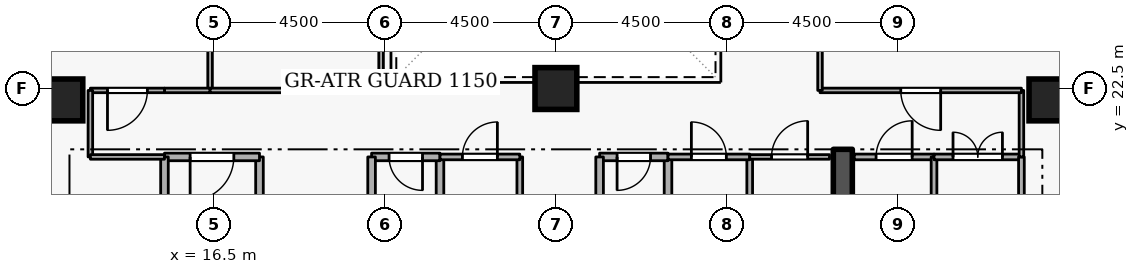
"""IFC4 building model, lengths in metres.
Left out: names, types, materials, properties, quantities, classifications, styles, units other than length and angle.
Written with IfcOpenShell. Run it as: python <this file> out.ifc"""

import sys

from ifc_helpers import new_model, si_unit, direction, frame, frame_2d, origin, origin_2d, place, context, subcontext, project, spatial, rectangle, extrude, element, fill, save


model = new_model("IFC4")
c1 = context("Model", 3, precision=1e-05, world=origin(), true_north=direction((0.0, 1.0)))
c2 = subcontext(c1, "Body", "Model", "MODEL_VIEW")
j1 = project(units=[si_unit("LENGTHUNIT", "METRE"), si_unit("PLANEANGLEUNIT", "RADIAN")], contexts=[c1])
p1 = place(None, origin())
s1 = spatial("IfcSite", under=j1, at=p1, CompositionType="ELEMENT")
p2 = place(p1, origin())
s2 = spatial("IfcBuilding", under=s1, at=p2, CompositionType="ELEMENT")
p3 = place(p2, frame((0.0, 0.0, 185.7)))
s3 = spatial("IfcBuildingStorey", under=s2, at=p3, CompositionType="ELEMENT", Elevation=185.7)
p4 = place(p3, frame((33.05, 15.1, 0.0), z_axis=(0.0, 0.0, 1.0), x_axis=(0.0, 1.0, 0.0)))
e1 = element("IfcWall", 1, at=p4, inside=s3, PredefinedType="SHEAR", context=c2, shape_type="SweptSolid", body=[
    extrude(rectangle(XDim=5.8, YDim=0.5, at=frame_2d((2.9, 0.0))), origin(), (0.0, 0.0, 1.0), 3.6),
])
for number, where, z_axis, x_axis in (
    (2, (12.5, 22.2, 0.0), (0.0, 0.0, 1.0), (1.0, 0.0, 0.0)),
    (3, (38.5, 22.2, 0.0), (0.0, 0.0, 1.0), (1.0, 0.0, 0.0)),
    (4, (25.5, 22.5, 0.0), (0.0, 0.0, 1.0), (1.0, 0.0, 0.0)),
):
    element("IfcColumn", number, at=place(p3, frame(where, z_axis=z_axis, x_axis=x_axis)), inside=s3, PredefinedType="COLUMN", context=c2, shape_type="SweptSolid", body=[
        extrude(rectangle(XDim=1.1, YDim=1.1, at=origin_2d()), origin(), (0.0, 0.0, 1.0), 3.6),
    ])
p5 = place(p3, frame((17.7, 18.4, 0.0), z_axis=(0.0, 0.0, 1.0), x_axis=(0.0, 1.0, 0.0)))
e5 = element("IfcWall", 5, at=p5, inside=s3, PredefinedType="STANDARD", context=c2, shape_type="SweptSolid", body=[
    extrude(rectangle(XDim=2.3, YDim=0.2, at=frame_2d((1.15, 0.0))), origin(), (0.0, 0.0, 1.0), 2.545),
])
p6 = place(p3, frame((17.7, 20.7, 0.0), z_axis=(0.0, 0.0, 1.0), x_axis=(-1.0, 0.0, 0.0)))
e6 = element("IfcWall", 6, at=p6, inside=s3, PredefinedType="STANDARD", context=c2, shape_type="SweptSolid", body=[
    extrude(rectangle(XDim=2.5, YDim=0.2, at=frame_2d((1.25, 0.0))), origin(), (0.0, 0.0, 1.0), 3.34),
])
p7 = place(p6, frame((0.675, 0.0, 0.0)))
e7 = element("IfcOpeningElement", 7, at=p7, cuts=e6, PredefinedType="OPENING", context=c2, shape_type="SweptSolid", body=[
    extrude(rectangle(XDim=1.15, YDim=2.1, at=frame_2d((0.575, 1.05))), frame((0.0, 0.11, 0.0), z_axis=(0.0, -1.0, 0.0), x_axis=(1.0, 0.0, 0.0)), (0.0, 0.0, 1.0), 0.22),
])
p8 = place(p3, frame((15.2, 20.7, 0.0), z_axis=(0.0, 0.0, 1.0), x_axis=(0.0, -1.0, 0.0)))
e8 = element("IfcWall", 8, at=p8, inside=s3, PredefinedType="STANDARD", context=c2, shape_type="SweptSolid", body=[
    extrude(rectangle(XDim=5.7, YDim=0.2, at=frame_2d((2.85, 0.0))), origin(), (0.0, 0.0, 1.0), 3.34),
])
p9 = place(p3, frame((28.45, 18.65, 0.0), z_axis=(0.0, 0.0, 1.0), x_axis=(0.0, 1.0, 0.0)))
e9 = element("IfcWall", 9, at=p9, inside=s3, PredefinedType="STANDARD", context=c2, shape_type="SweptSolid", body=[
    extrude(rectangle(XDim=2.05, YDim=0.2, at=frame_2d((1.025, 0.0))), origin(), (0.0, 0.0, 1.0), 3.34),
])
p10 = place(p3, frame((28.45, 20.7, 0.0), z_axis=(0.0, 0.0, 1.0), x_axis=(-1.0, 0.0, 0.0)))
e10 = element("IfcWall", 10, at=p10, inside=s3, PredefinedType="STANDARD", context=c2, shape_type="SweptSolid", body=[
    extrude(rectangle(XDim=1.8, YDim=0.2, at=frame_2d((0.9, 0.0))), origin(), (0.0, 0.0, 1.0), 3.34),
])
p11 = place(p10, frame((0.46, 0.0, 0.0)))
e11 = element("IfcOpeningElement", 11, at=p11, cuts=e10, PredefinedType="OPENING", context=c2, shape_type="SweptSolid", body=[
    extrude(rectangle(XDim=0.88, YDim=2.04, at=frame_2d((0.44, 1.02))), frame((0.0, 0.11, 0.0), z_axis=(0.0, -1.0, 0.0), x_axis=(1.0, 0.0, 0.0)), (0.0, 0.0, 1.0), 0.22),
])
for number, where, z_axis, x_axis in (
    (12, (26.65, 20.7, 0.0), (0.0, 0.0, 1.0), (0.0, -1.0, 0.0)),
    (13, (22.45, 18.65, 0.0), (0.0, 0.0, 1.0), (0.0, 1.0, 0.0)),
):
    element("IfcWall", number, at=place(p3, frame(where, z_axis=z_axis, x_axis=x_axis)), inside=s3, PredefinedType="STANDARD", context=c2, shape_type="SweptSolid", body=[
        extrude(rectangle(XDim=2.05, YDim=0.2, at=frame_2d((1.025, 0.0))), origin(), (0.0, 0.0, 1.0), 3.34),
    ])
p12 = place(p3, frame((22.45, 20.7, 0.0), z_axis=(0.0, 0.0, 1.0), x_axis=(-1.0, 0.0, 0.0)))
e14 = element("IfcWall", 14, at=p12, inside=s3, PredefinedType="STANDARD", context=c2, shape_type="SweptSolid", body=[
    extrude(rectangle(XDim=1.8, YDim=0.2, at=frame_2d((0.9, 0.0))), origin(), (0.0, 0.0, 1.0), 3.34),
])
p13 = place(p12, frame((0.46, 0.0, 0.0)))
e15 = element("IfcOpeningElement", 15, at=p13, cuts=e14, PredefinedType="OPENING", context=c2, shape_type="SweptSolid", body=[
    extrude(rectangle(XDim=0.88, YDim=2.04, at=frame_2d((0.44, 1.02))), frame((0.0, 0.11, 0.0), z_axis=(0.0, -1.0, 0.0), x_axis=(1.0, 0.0, 0.0)), (0.0, 0.0, 1.0), 0.22),
])
p14 = place(p3, frame((20.65, 20.7, 0.0), z_axis=(0.0, 0.0, 1.0), x_axis=(0.0, -1.0, 0.0)))
e16 = element("IfcWall", 16, at=p14, inside=s3, PredefinedType="STANDARD", context=c2, shape_type="SweptSolid", body=[
    extrude(rectangle(XDim=2.05, YDim=0.2, at=frame_2d((1.025, 0.0))), origin(), (0.0, 0.0, 1.0), 3.34),
])
p15 = place(p3, frame((24.55, 20.7, 0.0), z_axis=(0.0, 0.0, 1.0), x_axis=(0.0, -1.0, 0.0)))
e17 = element("IfcWall", 17, at=p15, inside=s3, PredefinedType="PARTITIONING", context=c2, shape_type="SweptSolid", body=[
    extrude(rectangle(XDim=2.05, YDim=0.15, at=frame_2d((1.025, 0.0))), origin(), (0.0, 0.0, 1.0), 3.34),
])
p16 = place(p3, frame((22.45, 20.7, 0.0), z_axis=(0.0, 0.0, 1.0), x_axis=(1.0, 0.0, 0.0)))
e18 = element("IfcWall", 18, at=p16, inside=s3, PredefinedType="PARTITIONING", context=c2, shape_type="SweptSolid", body=[
    extrude(rectangle(XDim=2.1, YDim=0.15, at=frame_2d((1.05, 0.0))), origin(), (0.0, 0.0, 1.0), 3.34),
])
p17 = place(p16, frame((0.59, 0.0, 0.0)))
e19 = element("IfcOpeningElement", 19, at=p17, cuts=e18, PredefinedType="OPENING", context=c2, shape_type="SweptSolid", body=[
    extrude(rectangle(XDim=0.92, YDim=2.08, at=frame_2d((0.46, 1.04))), frame((0.0, 0.085, 0.0), z_axis=(0.0, -1.0, 0.0), x_axis=(1.0, 0.0, 0.0)), (0.0, 0.0, 1.0), 0.17),
])
p18 = place(p3, frame((30.6, 20.7, 0.0), z_axis=(0.0, 0.0, 1.0), x_axis=(0.0, -1.0, 0.0)))
e20 = element("IfcWall", 20, at=p18, inside=s3, PredefinedType="PARTITIONING", context=c2, shape_type="SweptSolid", body=[
    extrude(rectangle(XDim=2.05, YDim=0.15, at=frame_2d((1.025, 0.0))), origin(), (0.0, 0.0, 1.0), 3.34),
])
p19 = place(p3, frame((28.45, 20.7, 0.0), z_axis=(0.0, 0.0, 1.0), x_axis=(1.0, 0.0, 0.0)))
e21 = element("IfcWall", 21, at=p19, inside=s3, PredefinedType="PARTITIONING", context=c2, shape_type="SweptSolid", body=[
    extrude(rectangle(XDim=2.15, YDim=0.15, at=frame_2d((1.075, 0.0))), origin(), (0.0, 0.0, 1.0), 3.34),
])
p20 = place(p19, frame((0.615, 0.0, 0.0)))
e22 = element("IfcOpeningElement", 22, at=p20, cuts=e21, PredefinedType="OPENING", context=c2, shape_type="SweptSolid", body=[
    extrude(rectangle(XDim=0.92, YDim=2.08, at=frame_2d((0.46, 1.04))), frame((0.0, 0.085, 0.0), z_axis=(0.0, -1.0, 0.0), x_axis=(1.0, 0.0, 0.0)), (0.0, 0.0, 1.0), 0.17),
])
p21 = place(p3, frame((30.6, 20.7, 0.0), z_axis=(0.0, 0.0, 1.0), x_axis=(1.0, 0.0, 0.0)))
e23 = element("IfcWall", 23, at=p21, inside=s3, PredefinedType="PARTITIONING", context=c2, shape_type="SweptSolid", body=[
    extrude(rectangle(XDim=2.1, YDim=0.12, at=frame_2d((1.05, 0.0))), origin(), (0.0, 0.0, 1.0), 3.34),
])
p22 = place(p21, frame((0.575, 0.0, 0.0)))
e24 = element("IfcOpeningElement", 24, at=p22, cuts=e23, PredefinedType="OPENING", context=c2, shape_type="SweptSolid", body=[
    extrude(rectangle(XDim=0.95, YDim=2.1, at=frame_2d((0.475, 1.05))), frame((0.0, 0.07, 0.0), z_axis=(0.0, -1.0, 0.0), x_axis=(1.0, 0.0, 0.0)), (0.0, 0.0, 1.0), 0.14),
])
p23 = place(p3, frame((33.35, 20.7, 0.0), z_axis=(0.0, 0.0, 1.0), x_axis=(1.0, 0.0, 0.0)))
e25 = element("IfcWall", 25, at=p23, inside=s3, PredefinedType="PARTITIONING", context=c2, shape_type="SweptSolid", body=[
    extrude(rectangle(XDim=2.1, YDim=0.15, at=frame_2d((1.05, 0.0))), origin(), (0.0, 0.0, 1.0), 3.34),
])
p24 = place(p23, frame((0.575, 0.0, 0.0)))
e26 = element("IfcOpeningElement", 26, at=p24, cuts=e25, PredefinedType="OPENING", context=c2, shape_type="SweptSolid", body=[
    extrude(rectangle(XDim=0.95, YDim=2.1, at=frame_2d((0.475, 1.05))), frame((0.0, 0.085, 0.0), z_axis=(0.0, -1.0, 0.0), x_axis=(1.0, 0.0, 0.0)), (0.0, 0.0, 1.0), 0.17),
])
p25 = place(p3, frame((35.45, 20.7, 0.0), z_axis=(0.0, 0.0, 1.0), x_axis=(0.0, -1.0, 0.0)))
e27 = element("IfcWall", 27, at=p25, inside=s3, PredefinedType="PARTITIONING", context=c2, shape_type="SweptSolid", body=[
    extrude(rectangle(XDim=5.65, YDim=0.15, at=frame_2d((2.825, 0.0))), origin(), (0.0, 0.0, 1.0), 3.34),
])
p26 = place(p3, frame((35.45, 20.7, 0.0), z_axis=(0.0, 0.0, 1.0), x_axis=(1.0, 0.0, 0.0)))
e28 = element("IfcWall", 28, at=p26, inside=s3, PredefinedType="PARTITIONING", context=c2, shape_type="SweptSolid", body=[
    extrude(rectangle(XDim=2.3, YDim=0.15, at=frame_2d((1.15, 0.0))), origin(), (0.0, 0.0, 1.0), 3.34),
])
p27 = place(p26, frame((0.5, 0.0, 0.0)))
e29 = element("IfcOpeningElement", 29, at=p27, cuts=e28, PredefinedType="OPENING", context=c2, shape_type="SweptSolid", body=[
    extrude(rectangle(XDim=1.3, YDim=2.12, at=frame_2d((0.65, 1.06))), frame((0.0, 0.085, 0.0), z_axis=(0.0, -1.0, 0.0), x_axis=(1.0, 0.0, 0.0)), (0.0, 0.0, 1.0), 0.17),
])
p28 = place(p3, frame((37.75, 20.7, 0.0), z_axis=(0.0, 0.0, 1.0), x_axis=(0.0, -1.0, 0.0)))
e30 = element("IfcWall", 30, at=p28, inside=s3, PredefinedType="PARTITIONING", context=c2, shape_type="SweptSolid", body=[
    extrude(rectangle(XDim=5.65, YDim=0.15, at=frame_2d((2.825, 0.0))), origin(), (0.0, 0.0, 1.0), 3.34),
])
p29 = place(p3, frame((16.4, 27.0, 0.0), z_axis=(0.0, 0.0, 1.0), x_axis=(0.0, -1.0, 0.0)))
e31 = element("IfcWall", 31, at=p29, inside=s3, PredefinedType="PARTITIONING", context=c2, shape_type="SweptSolid", body=[
    extrude(rectangle(XDim=4.55, YDim=0.12, at=frame_2d((2.275, 0.0))), origin(), (0.0, 0.0, 1.0), 3.34),
])
p30 = place(p3, frame((16.4, 22.45, 0.0), z_axis=(0.0, 0.0, 1.0), x_axis=(-1.0, 0.0, 0.0)))
e32 = element("IfcWall", 32, at=p30, inside=s3, PredefinedType="PARTITIONING", context=c2, shape_type="SweptSolid", body=[
    extrude(rectangle(XDim=1.2, YDim=0.12, at=frame_2d((0.6, 0.0))), origin(), (0.0, 0.0, 1.0), 3.34),
])
p31 = place(p3, frame((15.2, 22.45, 0.0), z_axis=(0.0, 0.0, 1.0), x_axis=(-1.0, 0.0, 0.0)))
e33 = element("IfcWall", 33, at=p31, inside=s3, PredefinedType="PARTITIONING", context=c2, shape_type="SweptSolid", body=[
    extrude(rectangle(XDim=1.95, YDim=0.12, at=frame_2d((0.975, 0.0))), origin(), (0.0, 0.0, 1.0), 3.34),
])
p32 = place(p31, frame((0.45, 0.0, 0.0)))
e34 = element("IfcOpeningElement", 34, at=p32, cuts=e33, PredefinedType="OPENING", context=c2, shape_type="SweptSolid", body=[
    extrude(rectangle(XDim=1.05, YDim=2.1, at=frame_2d((0.525, 1.05))), frame((0.0, 0.07, 0.0), z_axis=(0.0, -1.0, 0.0), x_axis=(1.0, 0.0, 0.0)), (0.0, 0.0, 1.0), 0.14),
])
p33 = place(p3, frame((13.25, 22.45, 0.0), z_axis=(0.0, 0.0, 1.0), x_axis=(0.0, -1.0, 0.0)))
e35 = element("IfcWall", 35, at=p33, inside=s3, PredefinedType="PARTITIONING", context=c2, shape_type="SweptSolid", body=[
    extrude(rectangle(XDim=1.75, YDim=0.12, at=frame_2d((0.875, 0.0))), origin(), (0.0, 0.0, 1.0), 3.34),
])
p34 = place(p3, frame((13.25, 20.7, 0.0), z_axis=(0.0, 0.0, 1.0), x_axis=(1.0, 0.0, 0.0)))
e36 = element("IfcWall", 36, at=p34, inside=s3, PredefinedType="PARTITIONING", context=c2, shape_type="SweptSolid", body=[
    extrude(rectangle(XDim=1.95, YDim=0.12, at=frame_2d((0.975, 0.0))), origin(), (0.0, 0.0, 1.0), 3.34),
])
p35 = place(p3, frame((20.9, 31.55, 0.0), z_axis=(0.0, 0.0, 1.0), x_axis=(0.0, -1.0, 0.0)))
e37 = element("IfcWall", 37, at=p35, inside=s3, PredefinedType="PARTITIONING", context=c2, shape_type="SweptSolid", body=[
    extrude(rectangle(XDim=9.1, YDim=0.12, at=frame_2d((4.55, 0.0))), origin(), (0.0, 0.0, 1.0), 3.34),
])
p36 = place(p3, frame((20.9, 22.45, 0.0), z_axis=(0.0, 0.0, 1.0), x_axis=(-1.0, 0.0, 0.0)))
e38 = element("IfcWall", 38, at=p36, inside=s3, PredefinedType="PARTITIONING", context=c2, shape_type="SweptSolid", body=[
    extrude(rectangle(XDim=4.5, YDim=0.12, at=frame_2d((2.25, 0.0))), origin(), (0.0, 0.0, 1.0), 3.34),
])
p37 = place(p3, frame((37.75, 20.7, 0.0), z_axis=(0.0, 0.0, 1.0), x_axis=(0.0, 1.0, 0.0)))
e39 = element("IfcWall", 39, at=p37, inside=s3, PredefinedType="PARTITIONING", context=c2, shape_type="SweptSolid", body=[
    extrude(rectangle(XDim=1.75, YDim=0.12, at=frame_2d((0.875, 0.0))), origin(), (0.0, 0.0, 1.0), 3.34),
])
p38 = place(p3, frame((37.75, 22.45, 0.0), z_axis=(0.0, 0.0, 1.0), x_axis=(-1.0, 0.0, 0.0)))
e40 = element("IfcWall", 40, at=p38, inside=s3, PredefinedType="PARTITIONING", context=c2, shape_type="SweptSolid", body=[
    extrude(rectangle(XDim=5.3, YDim=0.12, at=frame_2d((2.65, 0.0))), origin(), (0.0, 0.0, 1.0), 3.34),
])
p39 = place(p38, frame((2.125, 0.0, 0.0)))
e41 = element("IfcOpeningElement", 41, at=p39, cuts=e40, PredefinedType="OPENING", context=c2, shape_type="SweptSolid", body=[
    extrude(rectangle(XDim=1.05, YDim=2.1, at=frame_2d((0.525, 1.05))), frame((0.0, 0.07, 0.0), z_axis=(0.0, -1.0, 0.0), x_axis=(1.0, 0.0, 0.0)), (0.0, 0.0, 1.0), 0.14),
])
p40 = place(p3, frame((32.45, 22.45, 0.0), z_axis=(0.0, 0.0, 1.0), x_axis=(0.0, 1.0, 0.0)))
e42 = element("IfcWall", 42, at=p40, inside=s3, PredefinedType="PARTITIONING", context=c2, shape_type="SweptSolid", body=[
    extrude(rectangle(XDim=2.95, YDim=0.12, at=frame_2d((1.475, 0.0))), origin(), (0.0, 0.0, 1.0), 3.34),
])
p41 = place(p7, origin())
e43 = element("IfcDoor", 43, at=p41, inside=s3, OperationType="SINGLE_SWING_RIGHT", PredefinedType="DOOR", context=c2, shape_type="SweptSolid", body=[
    extrude(rectangle(XDim=1.15, YDim=2.1, at=frame_2d((0.575, 1.05))), frame((0.0, 0.025, 0.0), z_axis=(0.0, -1.0, 0.0), x_axis=(1.0, 0.0, 0.0)), (0.0, 0.0, 1.0), 0.05),
])
fill(e7, e43)
p42 = place(p11, origin())
e44 = element("IfcDoor", 44, at=p42, inside=s3, OperationType="SINGLE_SWING_RIGHT", PredefinedType="DOOR", context=c2, shape_type="SweptSolid", body=[
    extrude(rectangle(XDim=0.88, YDim=2.04, at=frame_2d((0.44, 1.02))), frame((0.0, 0.025, 0.0), z_axis=(0.0, -1.0, 0.0), x_axis=(1.0, 0.0, 0.0)), (0.0, 0.0, 1.0), 0.05),
])
fill(e11, e44)
p43 = place(p13, origin())
e45 = element("IfcDoor", 45, at=p43, inside=s3, OperationType="SINGLE_SWING_LEFT", PredefinedType="DOOR", context=c2, shape_type="SweptSolid", body=[
    extrude(rectangle(XDim=0.88, YDim=2.04, at=frame_2d((0.44, 1.02))), frame((0.0, 0.025, 0.0), z_axis=(0.0, -1.0, 0.0), x_axis=(1.0, 0.0, 0.0)), (0.0, 0.0, 1.0), 0.05),
])
fill(e15, e45)
p44 = place(p17, origin())
e46 = element("IfcDoor", 46, at=p44, inside=s3, OperationType="SINGLE_SWING_RIGHT", PredefinedType="DOOR", context=c2, shape_type="SweptSolid", body=[
    extrude(rectangle(XDim=0.92, YDim=2.08, at=frame_2d((0.46, 1.04))), frame((0.0, 0.025, 0.0), z_axis=(0.0, -1.0, 0.0), x_axis=(1.0, 0.0, 0.0)), (0.0, 0.0, 1.0), 0.05),
])
fill(e19, e46)
p45 = place(p20, origin())
e47 = element("IfcDoor", 47, at=p45, inside=s3, OperationType="SINGLE_SWING_LEFT", PredefinedType="DOOR", context=c2, shape_type="SweptSolid", body=[
    extrude(rectangle(XDim=0.92, YDim=2.08, at=frame_2d((0.46, 1.04))), frame((0.0, 0.025, 0.0), z_axis=(0.0, -1.0, 0.0), x_axis=(1.0, 0.0, 0.0)), (0.0, 0.0, 1.0), 0.05),
])
fill(e22, e47)
p46 = place(p22, origin())
e48 = element("IfcDoor", 48, at=p46, inside=s3, OperationType="SINGLE_SWING_RIGHT", PredefinedType="DOOR", context=c2, shape_type="SweptSolid", body=[
    extrude(rectangle(XDim=0.95, YDim=2.1, at=frame_2d((0.475, 1.05))), frame((0.0, 0.025, 0.0), z_axis=(0.0, -1.0, 0.0), x_axis=(1.0, 0.0, 0.0)), (0.0, 0.0, 1.0), 0.05),
])
fill(e24, e48)
p47 = place(p24, origin())
e49 = element("IfcDoor", 49, at=p47, inside=s3, OperationType="SINGLE_SWING_RIGHT", PredefinedType="DOOR", context=c2, shape_type="SweptSolid", body=[
    extrude(rectangle(XDim=0.95, YDim=2.1, at=frame_2d((0.475, 1.05))), frame((0.0, 0.025, 0.0), z_axis=(0.0, -1.0, 0.0), x_axis=(1.0, 0.0, 0.0)), (0.0, 0.0, 1.0), 0.05),
])
fill(e26, e49)
p48 = place(p27, origin())
e50 = element("IfcDoor", 50, at=p48, inside=s3, OperationType="DOUBLE_DOOR_SINGLE_SWING", PredefinedType="DOOR", context=c2, shape_type="SweptSolid", body=[
    extrude(rectangle(XDim=1.3, YDim=2.12, at=frame_2d((0.65, 1.06))), frame((0.0, 0.025, 0.0), z_axis=(0.0, -1.0, 0.0), x_axis=(1.0, 0.0, 0.0)), (0.0, 0.0, 1.0), 0.05),
])
fill(e29, e50)
p49 = place(p32, origin())
e51 = element("IfcDoor", 51, at=p49, inside=s3, OperationType="SINGLE_SWING_RIGHT", PredefinedType="DOOR", context=c2, shape_type="SweptSolid", body=[
    extrude(rectangle(XDim=1.05, YDim=2.1, at=frame_2d((0.525, 1.05))), frame((0.0, 0.025, 0.0), z_axis=(0.0, -1.0, 0.0), x_axis=(1.0, 0.0, 0.0)), (0.0, 0.0, 1.0), 0.05),
])
fill(e34, e51)
p50 = place(p39, origin())
e52 = element("IfcDoor", 52, at=p50, inside=s3, OperationType="SINGLE_SWING_LEFT", PredefinedType="DOOR", context=c2, shape_type="SweptSolid", body=[
    extrude(rectangle(XDim=1.05, YDim=2.1, at=frame_2d((0.525, 1.05))), frame((0.0, 0.025, 0.0), z_axis=(0.0, -1.0, 0.0), x_axis=(1.0, 0.0, 0.0)), (0.0, 0.0, 1.0), 0.05),
])
fill(e41, e52)
save(model, sys.argv[1])
